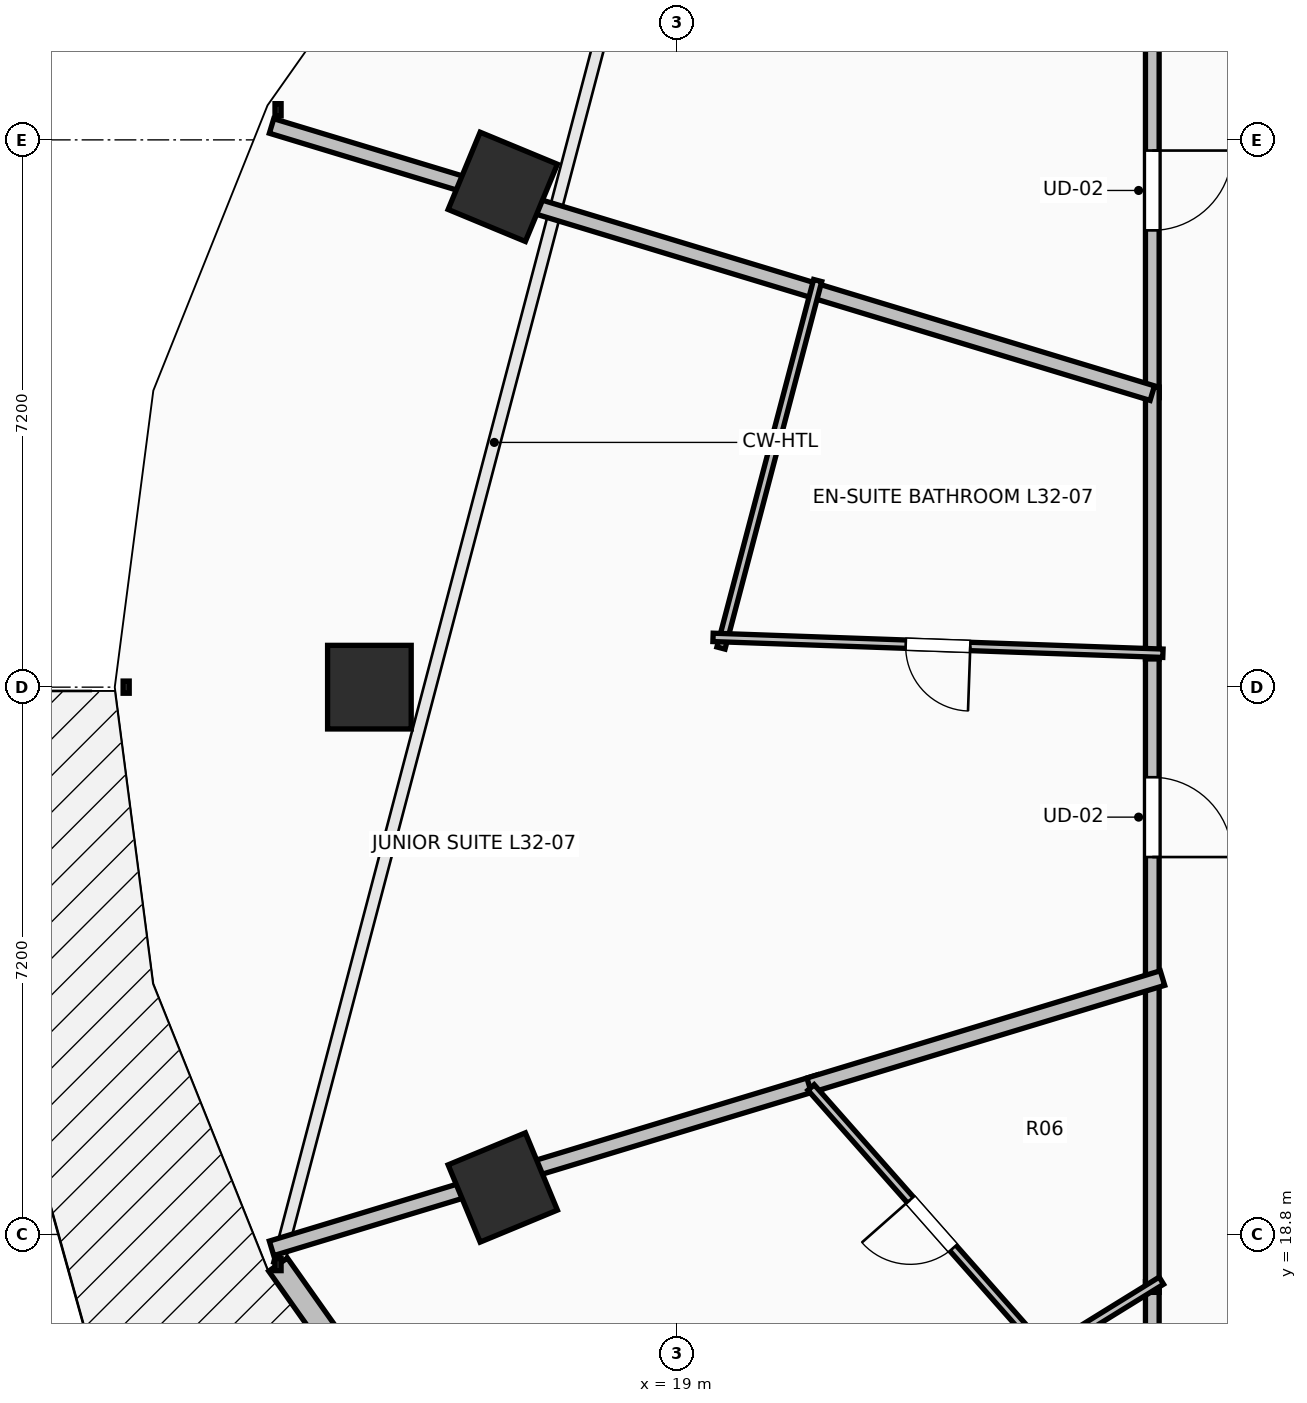
"""IFC4 building model, lengths in metres.
Left out: names, types, materials, properties, quantities, classifications, styles, units other than length and angle.
Written with IfcOpenShell. Run it as: python <this file> out.ifc"""

import sys

from ifc_helpers import new_model, si_unit, direction, frame, frame_2d, origin, origin_2d, place, context, subcontext, project, spatial, rectangle, extrude, element, fill, save


model = new_model("IFC4")
c1 = context("Model", 3, precision=1e-05, world=origin(), true_north=direction((0.0, 1.0)))
c2 = subcontext(c1, "Body", "Model", "MODEL_VIEW")
j1 = project(units=[si_unit("LENGTHUNIT", "METRE"), si_unit("PLANEANGLEUNIT", "RADIAN")], contexts=[c1])
p1 = place(None, origin())
s1 = spatial("IfcSite", under=j1, at=p1, CompositionType="ELEMENT")
p2 = place(p1, origin())
s2 = spatial("IfcBuilding", under=s1, at=p2, CompositionType="ELEMENT")
p3 = place(p2, frame((0.0, 0.0, 120.8)))
s3 = spatial("IfcBuildingStorey", under=s2, at=p3, CompositionType="ELEMENT", Elevation=120.8)
for number, where, z_axis, x_axis in (
    (1, (16.705, 32.582, 0.0), (0.0, 0.0, 1.0), (-0.924, 0.383, 0.0)),
    (2, (14.95, 26.0, 0.0), (0.0, 0.0, 1.0), (-1.0, 0.0, 0.0)),
    (3, (16.705, 19.418, 0.0), (0.0, 0.0, 1.0), (-0.924, -0.383, 0.0)),
):
    element("IfcColumn", number, at=place(p3, frame(where, z_axis=z_axis, x_axis=x_axis)), inside=s3, PredefinedType="COLUMN", context=c2, shape_type="SweptSolid", body=[
        extrude(rectangle(XDim=1.1, YDim=1.1, at=origin_2d()), origin(), (0.0, 0.0, 1.0), 3.5),
    ])
p4 = place(p3, frame((13.748, 18.404, 0.0), z_axis=(0.0, 0.0, 1.0), x_axis=(0.57716435238, -0.81662801222, 0.0)))
e4 = element("IfcWall", 4, at=p4, inside=s3, PredefinedType="STANDARD", context=c2, shape_type="SweptSolid", body=[
    extrude(rectangle(XDim=4.202, YDim=0.3, at=frame_2d((2.101, 0.0))), origin(), (0.0, 0.0, 1.0), 3.15),
])
p5 = place(p4, frame((1.351, 0.0, 0.85)))
e5 = element("IfcOpeningElement", 5, at=p5, cuts=e4, PredefinedType="OPENING", context=c2, shape_type="SweptSolid", body=[
    extrude(rectangle(XDim=1.5, YDim=2.1, at=frame_2d((0.75, 1.05))), frame((0.0, 0.165, 0.0), z_axis=(0.0, -1.0, 0.0), x_axis=(1.0, 0.0, 0.0)), (0.0, 0.0, 1.0), 0.33),
])
p6 = place(p3, frame((25.25, 35.261, 0.0), z_axis=(0.0, 0.0, 1.0), x_axis=(0.0, -1.0, 0.0)))
e6 = element("IfcWall", 6, at=p6, inside=s3, PredefinedType="PARTITIONING", context=c2, shape_type="SweptSolid", body=[
    extrude(rectangle(XDim=5.453, YDim=0.18, at=frame_2d((2.727, 0.0))), origin(), (0.0, 0.0, 1.0), 2.342),
])
p7 = place(p6, frame((2.201, 0.0, 0.0)))
e7 = element("IfcOpeningElement", 7, at=p7, cuts=e6, PredefinedType="OPENING", context=c2, shape_type="SweptSolid", body=[
    extrude(rectangle(XDim=1.05, YDim=2.2, at=frame_2d((0.525, 1.1))), frame((0.0, 0.105, 0.0), z_axis=(0.0, -1.0, 0.0), x_axis=(1.0, 0.0, 0.0)), (0.0, 0.0, 1.0), 0.21),
])
p8 = place(p3, frame((25.25, 26.511, 0.0), z_axis=(0.0, 0.0, 1.0), x_axis=(0.0, -1.0, 0.0)))
e8 = element("IfcWall", 8, at=p8, inside=s3, PredefinedType="PARTITIONING", context=c2, shape_type="SweptSolid", body=[
    extrude(rectangle(XDim=4.442, YDim=0.18, at=frame_2d((2.221, 0.0))), origin(), (0.0, 0.0, 1.0), 3.15),
])
p9 = place(p8, frame((1.696, 0.0, 0.0)))
e9 = element("IfcOpeningElement", 9, at=p9, cuts=e8, PredefinedType="OPENING", context=c2, shape_type="SweptSolid", body=[
    extrude(rectangle(XDim=1.05, YDim=2.2, at=frame_2d((0.525, 1.1))), frame((0.0, 0.105, 0.0), z_axis=(0.0, -1.0, 0.0), x_axis=(1.0, 0.0, 0.0)), (0.0, 0.0, 1.0), 0.21),
])
p10 = place(p3, frame((25.25, 29.948, 0.0), z_axis=(0.0, 0.0, 1.0), x_axis=(0.0, -1.0, 0.0)))
e10 = element("IfcWall", 10, at=p10, inside=s3, PredefinedType="PARTITIONING", context=c2, shape_type="SweptSolid", body=[
    extrude(rectangle(XDim=3.577, YDim=0.18, at=frame_2d((1.789, 0.0))), origin(), (0.0, 0.0, 1.0), 2.342),
])
p11 = place(p3, frame((25.25, 18.178, 0.0), z_axis=(0.0, 0.0, 1.0), x_axis=(0.0, -1.0, 0.0)))
e11 = element("IfcWall", 11, at=p11, inside=s3, PredefinedType="PARTITIONING", context=c2, shape_type="SweptSolid", body=[
    extrude(rectangle(XDim=4.078, YDim=0.18, at=frame_2d((2.039, 0.0))), origin(), (0.0, 0.0, 1.0), 2.342),
])
p12 = place(p11, frame((1.514, 0.0, 0.0)))
e12 = element("IfcOpeningElement", 12, at=p12, cuts=e11, PredefinedType="OPENING", context=c2, shape_type="SweptSolid", body=[
    extrude(rectangle(XDim=1.05, YDim=2.2, at=frame_2d((0.525, 1.1))), frame((0.0, 0.105, 0.0), z_axis=(0.0, -1.0, 0.0), x_axis=(1.0, 0.0, 0.0)), (0.0, 0.0, 1.0), 0.21),
])
p13 = place(p3, frame((25.25, 22.209, 0.0), z_axis=(0.0, 0.0, 1.0), x_axis=(0.0, -1.0, 0.0)))
e13 = element("IfcWall", 13, at=p13, inside=s3, PredefinedType="PARTITIONING", context=c2, shape_type="SweptSolid", body=[
    extrude(rectangle(XDim=4.171, YDim=0.18, at=frame_2d((2.085, 0.0))), origin(), (0.0, 0.0, 1.0), 3.15),
])
p14 = place(p3, frame((13.663, 33.383, 0.0), z_axis=(0.0, 0.0, 1.0), x_axis=(0.956933802543, -0.290306213422, 0.0)))
e14 = element("IfcWall", 14, at=p14, inside=s3, PredefinedType="PARTITIONING", context=c2, shape_type="SweptSolid", body=[
    extrude(rectangle(XDim=12.108, YDim=0.2, at=frame_2d((6.054, 0.0))), origin(), (0.0, 0.0, 1.0), 2.342),
])
p15 = place(p3, frame((19.575, 26.515, 0.0), z_axis=(0.0, 0.0, 1.0), x_axis=(0.254478876497, 0.967078332617, 0.0)))
e15 = element("IfcWall", 15, at=p15, inside=s3, PredefinedType="PARTITIONING", context=c2, shape_type="SweptSolid", body=[
    extrude(rectangle(XDim=4.999, YDim=0.11, at=frame_2d((2.5, 0.0))), origin(), (0.0, 0.0, 1.0), 2.342),
])
p16 = place(p3, frame((25.39, 26.446, 0.0), z_axis=(0.0, 0.0, 1.0), x_axis=(-0.999378666741, 0.03524599926, 0.0)))
e16 = element("IfcWall", 16, at=p16, inside=s3, PredefinedType="PARTITIONING", context=c2, shape_type="SweptSolid", body=[
    extrude(rectangle(XDim=5.922, YDim=0.11, at=frame_2d((2.961, 0.0))), origin(), (0.0, 0.0, 1.0), 2.342),
])
p17 = place(p16, frame((2.536, 0.0, 0.0)))
e17 = element("IfcOpeningElement", 17, at=p17, cuts=e16, PredefinedType="OPENING", context=c2, shape_type="SweptSolid", body=[
    extrude(rectangle(XDim=0.85, YDim=2.1, at=frame_2d((0.425, 1.05))), frame((0.0, 0.07, 0.0), z_axis=(0.0, -1.0, 0.0), x_axis=(1.0, 0.0, 0.0)), (0.0, 0.0, 1.0), 0.14),
])
p18 = place(p3, frame((13.663, 18.617, 0.0), z_axis=(0.0, 0.0, 1.0), x_axis=(0.956933827214, 0.290306132098, 0.0)))
e18 = element("IfcWall", 18, at=p18, inside=s3, PredefinedType="PARTITIONING", context=c2, shape_type="SweptSolid", body=[
    extrude(rectangle(XDim=7.53, YDim=0.2, at=frame_2d((3.765, 0.0))), origin(), (0.0, 0.0, 1.0), 2.839),
])
p19 = place(p3, frame((20.735, 20.762, 0.0), z_axis=(0.0, 0.0, 1.0), x_axis=(0.956916986017, 0.290361639807, 0.0)))
e19 = element("IfcWall", 19, at=p19, inside=s3, PredefinedType="PARTITIONING", context=c2, shape_type="SweptSolid", body=[
    extrude(rectangle(XDim=4.858, YDim=0.2, at=frame_2d((2.429, 0.0))), origin(), (0.0, 0.0, 1.0), 2.784),
])
p20 = place(p3, frame((25.369, 18.192, 0.0), z_axis=(0.0, 0.0, 1.0), x_axis=(-0.850587393094, -0.525833706328, 0.0)))
e20 = element("IfcWall", 20, at=p20, inside=s3, PredefinedType="PARTITIONING", context=c2, shape_type="SweptSolid", body=[
    extrude(rectangle(XDim=1.937, YDim=0.11, at=frame_2d((0.968, 0.0))), origin(), (0.0, 0.0, 1.0), 2.342),
])
p21 = place(p3, frame((23.934, 17.142, 0.0), z_axis=(0.0, 0.0, 1.0), x_axis=(-0.662103338525, 0.749412549344, 0.0)))
e21 = element("IfcWall", 21, at=p21, inside=s3, PredefinedType="PARTITIONING", context=c2, shape_type="SweptSolid", body=[
    extrude(rectangle(XDim=4.793, YDim=0.11, at=frame_2d((2.396, 0.0))), origin(), (0.0, 0.0, 1.0), 2.342),
])
p22 = place(p21, frame((1.971, 0.0, 0.0)))
e22 = element("IfcOpeningElement", 22, at=p22, cuts=e21, PredefinedType="OPENING", context=c2, shape_type="SweptSolid", body=[
    extrude(rectangle(XDim=0.85, YDim=2.1, at=frame_2d((0.425, 1.05))), frame((0.0, 0.07, 0.0), z_axis=(0.0, -1.0, 0.0), x_axis=(1.0, 0.0, 0.0)), (0.0, 0.0, 1.0), 0.14),
])
p23 = place(p7, origin())
e23 = element("IfcDoor", 23, at=p23, inside=s3, OperationType="SINGLE_SWING_LEFT", PredefinedType="DOOR", context=c2, shape_type="SweptSolid", body=[
    extrude(rectangle(XDim=1.05, YDim=2.2, at=frame_2d((0.525, 1.1))), frame((0.0, 0.025, 0.0), z_axis=(0.0, -1.0, 0.0), x_axis=(1.0, 0.0, 0.0)), (0.0, 0.0, 1.0), 0.05),
])
fill(e7, e23)
p24 = place(p9, origin())
e24 = element("IfcDoor", 24, at=p24, inside=s3, OperationType="SINGLE_SWING_RIGHT", PredefinedType="DOOR", context=c2, shape_type="SweptSolid", body=[
    extrude(rectangle(XDim=1.05, YDim=2.2, at=frame_2d((0.525, 1.1))), frame((0.0, 0.025, 0.0), z_axis=(0.0, -1.0, 0.0), x_axis=(1.0, 0.0, 0.0)), (0.0, 0.0, 1.0), 0.05),
])
fill(e9, e24)
p25 = place(p17, origin())
e25 = element("IfcDoor", 25, at=p25, inside=s3, OperationType="SINGLE_SWING_LEFT", PredefinedType="DOOR", context=c2, shape_type="SweptSolid", body=[
    extrude(rectangle(XDim=0.85, YDim=2.1, at=frame_2d((0.425, 1.05))), frame((0.0, 0.025, 0.0), z_axis=(0.0, -1.0, 0.0), x_axis=(1.0, 0.0, 0.0)), (0.0, 0.0, 1.0), 0.05),
])
fill(e17, e25)
p26 = place(p22, origin())
e26 = element("IfcDoor", 26, at=p26, inside=s3, OperationType="SINGLE_SWING_RIGHT", PredefinedType="DOOR", context=c2, shape_type="SweptSolid", body=[
    extrude(rectangle(XDim=0.85, YDim=2.1, at=frame_2d((0.425, 1.05))), frame((0.0, 0.025, 0.0), z_axis=(0.0, -1.0, 0.0), x_axis=(1.0, 0.0, 0.0)), (0.0, 0.0, 1.0), 0.05),
])
fill(e22, e26)
save(model, sys.argv[1])
